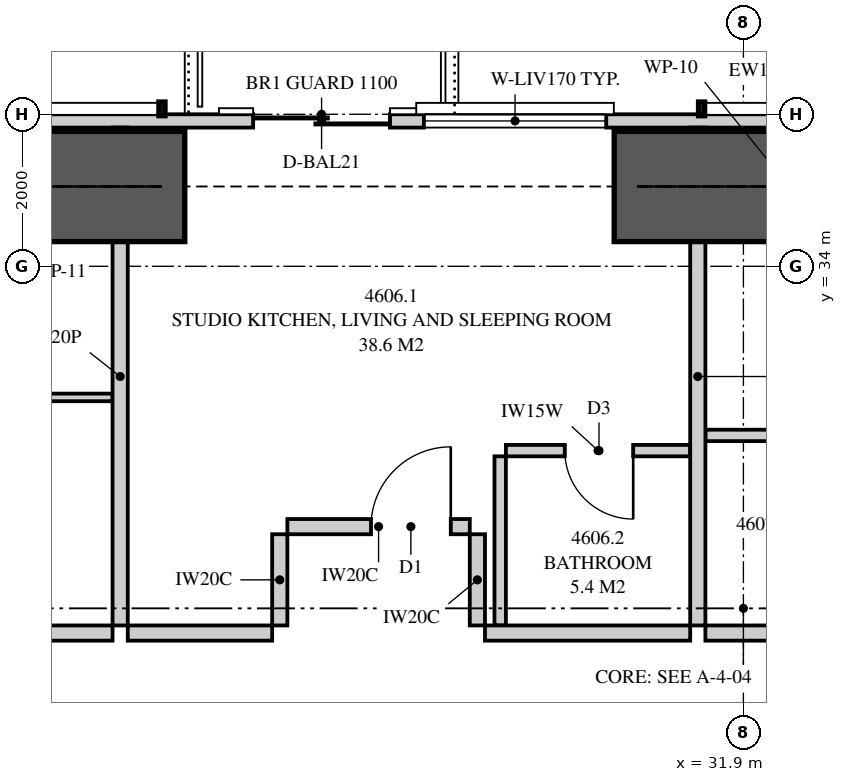
"""IFC4 building model, lengths in metres.
Left out: names, types, materials, properties, quantities, classifications, styles, units other than length and angle.
Written with IfcOpenShell. Run it as: python <this file> out.ifc"""

import sys

from ifc_helpers import new_model, si_unit, direction, frame, frame_2d, origin, place, context, subcontext, project, spatial, polyline, rectangle, outline, extrude, element, fill, save


model = new_model("IFC4")
c1 = context("Model", 3, precision=1e-05, world=origin(), true_north=direction((0.0, 1.0)))
c2 = subcontext(c1, "Body", "Model", "MODEL_VIEW")
j1 = project(units=[si_unit("LENGTHUNIT", "METRE"), si_unit("PLANEANGLEUNIT", "RADIAN")], contexts=[c1])
p1 = place(None, origin())
s1 = spatial("IfcSite", under=j1, at=p1, CompositionType="ELEMENT")
p2 = place(p1, origin())
s2 = spatial("IfcBuilding", under=s1, at=p2, CompositionType="ELEMENT")
p3 = place(p2, frame((0.0, 0.0, 171.1)))
s3 = spatial("IfcBuildingStorey", under=s2, at=p3, CompositionType="ELEMENT", Elevation=171.1)
p4 = place(p3, frame((49.949, 35.913, 0.0), z_axis=(0.0, 0.0, 1.0), x_axis=(-1.0, 0.0, 0.0)))
e1 = element("IfcWall", 1, at=p4, inside=s3, PredefinedType="SOLIDWALL", context=c2, shape_type="SweptSolid", body=[
    extrude(outline(polyline([(0.0, 0.0), (34.897, 0.0), (34.897, 3.11), (27.91, 3.11), (27.91, 2.15), (27.836, 2.15), (27.836, 3.11), (27.699, 3.11), (27.699, 2.15), (7.199, 2.15), (7.199, 3.11), (7.062, 3.11), (7.062, 2.15), (6.987, 2.15), (6.987, 3.11), (0.0, 3.11), (0.0, 0.0)])), frame((0.0, 0.087, 0.0), z_axis=(0.0, -1.0, 0.0), x_axis=(1.0, 0.0, 0.0)), (0.0, 0.0, 1.0), 0.175),
])
p5 = place(p4, frame((2.149, 0.0, 0.4)))
e2 = element("IfcOpeningElement", 2, at=p5, cuts=e1, PredefinedType="OPENING", context=c2, shape_type="SweptSolid", body=[
    extrude(rectangle(XDim=1.8, YDim=1.7, at=frame_2d((0.9, 0.85))), frame((0.0, 0.097, 0.0), z_axis=(0.0, -1.0, 0.0), x_axis=(1.0, 0.0, 0.0)), (0.0, 0.0, 1.0), 0.195),
])
p6 = place(p4, frame((10.299, 0.0, 0.0)))
e3 = element("IfcOpeningElement", 3, at=p6, cuts=e1, PredefinedType="OPENING", context=c2, shape_type="SweptSolid", body=[
    extrude(rectangle(XDim=1.8, YDim=2.1, at=frame_2d((0.9, 1.05))), frame((0.0, 0.097, 0.0), z_axis=(0.0, -1.0, 0.0), x_axis=(1.0, 0.0, 0.0)), (0.0, 0.0, 1.0), 0.195),
])
p7 = place(p4, frame((13.231, 0.0, 0.4)))
e4 = element("IfcOpeningElement", 4, at=p7, cuts=e1, PredefinedType="OPENING", context=c2, shape_type="SweptSolid", body=[
    extrude(rectangle(XDim=1.8, YDim=1.7, at=frame_2d((0.9, 0.85))), frame((0.0, 0.097, 0.0), z_axis=(0.0, -1.0, 0.0), x_axis=(1.0, 0.0, 0.0)), (0.0, 0.0, 1.0), 0.195),
])
p8 = place(p4, frame((22.699, 0.0, 0.0)))
e5 = element("IfcOpeningElement", 5, at=p8, cuts=e1, PredefinedType="OPENING", context=c2, shape_type="SweptSolid", body=[
    extrude(rectangle(XDim=1.8, YDim=2.1, at=frame_2d((0.9, 1.05))), frame((0.0, 0.097, 0.0), z_axis=(0.0, -1.0, 0.0), x_axis=(1.0, 0.0, 0.0)), (0.0, 0.0, 1.0), 0.195),
])
p9 = place(p4, frame((19.853, 0.0, 0.4)))
e6 = element("IfcOpeningElement", 6, at=p9, cuts=e1, PredefinedType="OPENING", context=c2, shape_type="SweptSolid", body=[
    extrude(rectangle(XDim=2.4, YDim=1.7, at=frame_2d((1.2, 0.85))), frame((0.0, 0.097, 0.0), z_axis=(0.0, -1.0, 0.0), x_axis=(1.0, 0.0, 0.0)), (0.0, 0.0, 1.0), 0.195),
])
p10 = place(p4, frame((30.104, 0.0, 0.4)))
e7 = element("IfcOpeningElement", 7, at=p10, cuts=e1, PredefinedType="OPENING", context=c2, shape_type="SweptSolid", body=[
    extrude(rectangle(XDim=2.4, YDim=1.7, at=frame_2d((1.2, 0.85))), frame((0.0, 0.097, 0.0), z_axis=(0.0, -1.0, 0.0), x_axis=(1.0, 0.0, 0.0)), (0.0, 0.0, 1.0), 0.195),
])
p11 = place(p3, frame((23.7, 35.825, 0.0), z_axis=(0.0, 0.0, 1.0), x_axis=(0.0, -1.0, 0.0)))
e8 = element("IfcWall", 8, at=p11, inside=s3, PredefinedType="PARTITIONING", context=c2, shape_type="SweptSolid", body=[
    extrude(outline(polyline([(0.529, 2.15), (0.0, 2.15), (0.0, 0.0), (0.529, 0.0), (0.529, 0.332), (1.021, 0.332), (1.021, 0.0), (6.55, 0.0), (6.55, 3.11), (1.685, 3.11), (1.685, 2.15), (1.021, 2.15), (1.021, 1.818), (0.529, 1.818), (0.529, 2.15)])), frame((0.0, 0.1, 0.0), z_axis=(0.0, -1.0, 0.0), x_axis=(1.0, 0.0, 0.0)), (0.0, 0.0, 1.0), 0.2),
])
p12 = place(p3, frame((17.85, 29.175, 0.0), z_axis=(0.0, 0.0, 1.0), x_axis=(1.0, 0.0, 0.0)))
e9 = element("IfcWall", 9, at=p12, inside=s3, PredefinedType="PARTITIONING", context=c2, shape_type="SweptSolid", body=[
    extrude(outline(polyline([(0.0, 0.0), (5.75, 0.0), (5.75, 3.11), (4.737, 3.11), (4.737, 2.541), (4.062, 2.541), (4.062, 3.11), (0.0, 3.11), (0.0, 0.0)])), frame((0.0, 0.1, 0.0), z_axis=(0.0, -1.0, 0.0), x_axis=(1.0, 0.0, 0.0)), (0.0, 0.0, 1.0), 0.2),
])
p13 = place(p12, frame((2.35, 0.0, 0.0)))
e10 = element("IfcOpeningElement", 10, at=p13, cuts=e9, PredefinedType="OPENING", context=c2, shape_type="SweptSolid", body=[
    extrude(rectangle(XDim=1.05, YDim=2.2, at=frame_2d((0.525, 1.1))), frame((0.0, 0.11, 0.0), z_axis=(0.0, -1.0, 0.0), x_axis=(1.0, 0.0, 0.0)), (0.0, 0.0, 1.0), 0.22),
])
p14 = place(p3, frame((20.05, 32.275, 0.0), z_axis=(0.0, 0.0, 1.0), x_axis=(1.0, 0.0, 0.0)))
e11 = element("IfcWall", 11, at=p14, inside=s3, PredefinedType="PARTITIONING", context=c2, shape_type="SweptSolid", body=[
    extrude(outline(polyline([(0.0, 0.0), (3.55, 0.0), (3.55, 3.11), (2.487, 3.11), (2.487, 2.541), (1.913, 2.541), (1.913, 3.11), (0.0, 3.11), (0.0, 0.0)])), frame((0.0, 0.05, 0.0), z_axis=(0.0, -1.0, 0.0), x_axis=(1.0, 0.0, 0.0)), (0.0, 0.0, 1.0), 0.1),
])
p15 = place(p14, frame((1.3, 0.0, 0.0)))
e12 = element("IfcOpeningElement", 12, at=p15, cuts=e11, PredefinedType="OPENING", context=c2, shape_type="SweptSolid", body=[
    extrude(rectangle(XDim=0.9, YDim=2.1, at=frame_2d((0.45, 1.05))), frame((0.0, 0.06, 0.0), z_axis=(0.0, -1.0, 0.0), x_axis=(1.0, 0.0, 0.0)), (0.0, 0.0, 1.0), 0.12),
])
p16 = place(p3, frame((31.3, 35.825, 0.0), z_axis=(0.0, 0.0, 1.0), x_axis=(0.0, -1.0, 0.0)))
e13 = element("IfcWall", 13, at=p16, inside=s3, PredefinedType="PARTITIONING", context=c2, shape_type="SweptSolid", body=[
    extrude(outline(polyline([(0.529, 2.15), (0.0, 2.15), (0.0, 0.0), (0.529, 0.0), (0.529, 0.541), (1.021, 0.541), (1.021, 0.0), (6.55, 0.0), (6.55, 3.11), (1.685, 3.11), (1.685, 2.15), (1.021, 2.15), (1.021, 1.608), (0.529, 1.608), (0.529, 2.15)])), frame((0.0, 0.1, 0.0), z_axis=(0.0, -1.0, 0.0), x_axis=(1.0, 0.0, 0.0)), (0.0, 0.0, 1.0), 0.2),
])
p17 = place(p3, frame((23.8, 29.175, 0.0), z_axis=(0.0, 0.0, 1.0), x_axis=(1.0, 0.0, 0.0)))
e14 = element("IfcWall", 14, at=p17, inside=s3, PredefinedType="PARTITIONING", context=c2, shape_type="SweptSolid", body=[
    extrude(rectangle(XDim=1.9, YDim=0.2, at=frame_2d((0.95, 0.0))), origin(), (0.0, 0.0, 1.0), 3.11),
])
p18 = place(p3, frame((28.775, 31.575, 0.0), z_axis=(0.0, 0.0, 1.0), x_axis=(1.0, 0.0, 0.0)))
e15 = element("IfcWall", 15, at=p18, inside=s3, PredefinedType="PLUMBINGWALL", context=c2, shape_type="SweptSolid", body=[
    extrude(rectangle(XDim=2.425, YDim=0.15, at=frame_2d((1.212, 0.0))), origin(), (0.0, 0.0, 1.0), 3.11),
])
p19 = place(p18, frame((0.775, 0.0, 0.0)))
e16 = element("IfcOpeningElement", 16, at=p19, cuts=e15, PredefinedType="OPENING", context=c2, shape_type="SweptSolid", body=[
    extrude(rectangle(XDim=0.9, YDim=2.1, at=frame_2d((0.45, 1.05))), frame((0.0, 0.085, 0.0), z_axis=(0.0, -1.0, 0.0), x_axis=(1.0, 0.0, 0.0)), (0.0, 0.0, 1.0), 0.17),
])
p20 = place(p3, frame((28.7, 31.5, 0.0), z_axis=(0.0, 0.0, 1.0), x_axis=(0.0, -1.0, 0.0)))
e17 = element("IfcWall", 17, at=p20, inside=s3, PredefinedType="PLUMBINGWALL", context=c2, shape_type="SweptSolid", body=[
    extrude(rectangle(XDim=2.225, YDim=0.15, at=frame_2d((1.113, 0.0))), origin(), (0.0, 0.0, 1.0), 3.11),
])
p21 = place(p3, frame((31.4, 29.175, 0.0), z_axis=(0.0, 0.0, 1.0), x_axis=(1.0, 0.0, 0.0)))
e18 = element("IfcWall", 18, at=p21, inside=s3, PredefinedType="PARTITIONING", context=c2, shape_type="SweptSolid", body=[
    extrude(outline(polyline([(0.0, 0.0), (9.55, 0.0), (9.55, 3.11), (1.437, 3.11), (1.437, 2.541), (0.763, 2.541), (0.763, 3.11), (0.0, 3.11), (0.0, 0.0)])), frame((0.0, 0.1, 0.0), z_axis=(0.0, -1.0, 0.0), x_axis=(1.0, 0.0, 0.0)), (0.0, 0.0, 1.0), 0.2),
])
p22 = place(p3, frame((31.4, 31.775, 0.0), z_axis=(0.0, 0.0, 1.0), x_axis=(1.0, 0.0, 0.0)))
e19 = element("IfcWall", 19, at=p22, inside=s3, PredefinedType="PLUMBINGWALL", context=c2, shape_type="SweptSolid", body=[
    extrude(outline(polyline([(0.0, 0.0), (5.75, 0.0), (5.75, 3.11), (1.412, 3.11), (1.412, 2.541), (0.788, 2.541), (0.788, 3.11), (0.0, 3.11), (0.0, 0.0)])), frame((0.0, 0.075, 0.0), z_axis=(0.0, -1.0, 0.0), x_axis=(1.0, 0.0, 0.0)), (0.0, 0.0, 1.0), 0.15),
])
p23 = place(p22, frame((4.45, 0.0, 0.0)))
e20 = element("IfcOpeningElement", 20, at=p23, cuts=e19, PredefinedType="OPENING", context=c2, shape_type="SweptSolid", body=[
    extrude(rectangle(XDim=0.9, YDim=2.1, at=frame_2d((0.45, 1.05))), frame((0.0, 0.085, 0.0), z_axis=(0.0, -1.0, 0.0), x_axis=(1.0, 0.0, 0.0)), (0.0, 0.0, 1.0), 0.17),
])
p24 = place(p3, frame((28.5, 29.175, 0.0), z_axis=(0.0, 0.0, 1.0), x_axis=(1.0, 0.0, 0.0)))
e21 = element("IfcWall", 21, at=p24, inside=s3, PredefinedType="PARTITIONING", context=c2, shape_type="SweptSolid", body=[
    extrude(rectangle(XDim=2.7, YDim=0.2, at=frame_2d((1.35, 0.0))), origin(), (0.0, 0.0, 1.0), 3.11),
])
p25 = place(p3, frame((25.9, 30.575, 0.0), z_axis=(0.0, 0.0, 1.0), x_axis=(1.0, 0.0, 0.0)))
e22 = element("IfcWall", 22, at=p25, inside=s3, PredefinedType="PARTITIONING", context=c2, shape_type="SweptSolid", body=[
    extrude(rectangle(XDim=2.4, YDim=0.2, at=frame_2d((1.2, 0.0))), origin(), (0.0, 0.0, 1.0), 3.11),
])
p26 = place(p25, frame((1.1, 0.0, 0.0)))
e23 = element("IfcOpeningElement", 23, at=p26, cuts=e22, PredefinedType="OPENING", context=c2, shape_type="SweptSolid", body=[
    extrude(rectangle(XDim=1.05, YDim=2.2, at=frame_2d((0.525, 1.1))), frame((0.0, 0.11, 0.0), z_axis=(0.0, -1.0, 0.0), x_axis=(1.0, 0.0, 0.0)), (0.0, 0.0, 1.0), 0.22),
])
for number, where, z_axis, x_axis in (
    (24, (25.8, 29.275, 0.0), (0.0, 0.0, 1.0), (0.0, 1.0, 0.0)),
    (25, (28.4, 29.275, 0.0), (0.0, 0.0, 1.0), (0.0, 1.0, 0.0)),
):
    element("IfcWall", number, at=place(p3, frame(where, z_axis=z_axis, x_axis=x_axis)), inside=s3, PredefinedType="PARTITIONING", context=c2, shape_type="SweptSolid", body=[
        extrude(rectangle(XDim=1.2, YDim=0.2, at=frame_2d((0.6, 0.0))), origin(), (0.0, 0.0, 1.0), 3.11),
    ])
for number, where, z_axis, x_axis in (
    (26, (30.2, 35.05, 0.0), (0.0, 0.0, 1.0), (1.0, 0.0, 0.0)),
    (27, (19.95, 35.05, 0.0), (0.0, 0.0, 1.0), (1.0, 0.0, 0.0)),
):
    element("IfcWall", number, at=place(p3, frame(where, z_axis=z_axis, x_axis=x_axis)), inside=s3, PredefinedType="SHEAR", context=c2, shape_type="SweptSolid", body=[
        extrude(rectangle(XDim=4.6, YDim=1.45, at=frame_2d((2.3, 0.0))), origin(), (0.0, 0.0, 1.0), 3.35),
    ])
p27 = place(p8, origin())
e28 = element("IfcDoor", 28, at=p27, inside=s3, OperationType="SLIDING_TO_LEFT", PredefinedType="DOOR", context=c2, shape_type="SweptSolid", body=[
    extrude(rectangle(XDim=1.8, YDim=2.1, at=frame_2d((0.9, 1.05))), frame((0.0, 0.025, 0.0), z_axis=(0.0, -1.0, 0.0), x_axis=(1.0, 0.0, 0.0)), (0.0, 0.0, 1.0), 0.05),
])
fill(e5, e28)
p28 = place(p9, origin())
e29 = element("IfcWindow", 29, at=p28, inside=s3, PartitioningType="SINGLE_PANEL", PredefinedType="WINDOW", context=c2, shape_type="SweptSolid", body=[
    extrude(rectangle(XDim=2.4, YDim=1.7, at=frame_2d((1.2, 0.85))), frame((0.0, 0.03, 0.0), z_axis=(0.0, -1.0, 0.0), x_axis=(1.0, 0.0, 0.0)), (0.0, 0.0, 1.0), 0.06),
])
fill(e6, e29)
p29 = place(p26, origin())
e30 = element("IfcDoor", 30, at=p29, inside=s3, OperationType="SINGLE_SWING_RIGHT", PredefinedType="DOOR", context=c2, shape_type="SweptSolid", body=[
    extrude(rectangle(XDim=1.05, YDim=2.2, at=frame_2d((0.525, 1.1))), frame((0.0, 0.025, 0.0), z_axis=(0.0, -1.0, 0.0), x_axis=(1.0, 0.0, 0.0)), (0.0, 0.0, 1.0), 0.05),
])
fill(e23, e30)
p30 = place(p19, frame((0.9, 0.0, 0.0), z_axis=(0.0, 0.0, 1.0), x_axis=(-1.0, 0.0, 0.0)))
e31 = element("IfcDoor", 31, at=p30, inside=s3, OperationType="SINGLE_SWING_LEFT", PredefinedType="DOOR", context=c2, shape_type="SweptSolid", body=[
    extrude(rectangle(XDim=0.9, YDim=2.1, at=frame_2d((0.45, 1.05))), frame((0.0, 0.025, 0.0), z_axis=(0.0, -1.0, 0.0), x_axis=(1.0, 0.0, 0.0)), (0.0, 0.0, 1.0), 0.05),
])
fill(e16, e31)
save(model, sys.argv[1])
